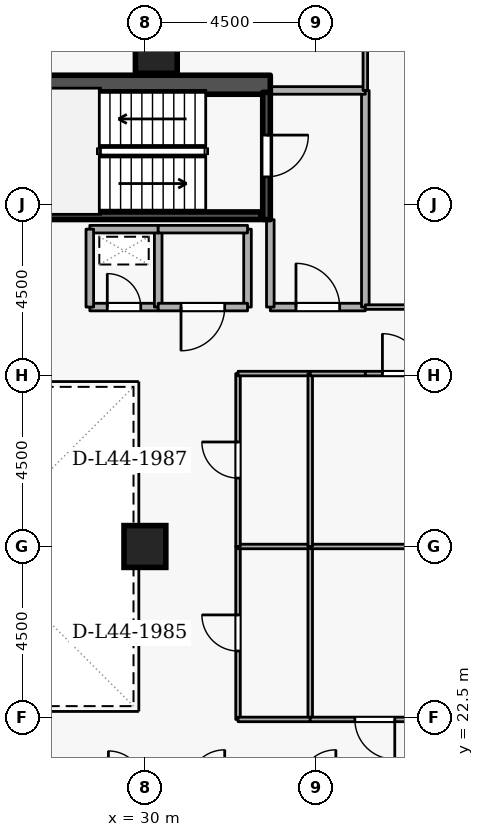
"""IFC4 building model, lengths in metres.
Left out: names, types, materials, properties, quantities, classifications, styles, units other than length and angle.
Written with IfcOpenShell. Run it as: python <this file> out.ifc"""

import sys

from ifc_helpers import new_model, si_unit, direction, frame, frame_2d, origin, origin_2d, place, context, subcontext, project, spatial, rectangle, extrude, element, fill, save


model = new_model("IFC4")
c1 = context("Model", 3, precision=1e-05, world=origin(), true_north=direction((0.0, 1.0)))
c2 = subcontext(c1, "Body", "Model", "MODEL_VIEW")
j1 = project(units=[si_unit("LENGTHUNIT", "METRE"), si_unit("PLANEANGLEUNIT", "RADIAN")], contexts=[c1])
p1 = place(None, origin())
s1 = spatial("IfcSite", under=j1, at=p1, CompositionType="ELEMENT")
p2 = place(p1, origin())
s2 = spatial("IfcBuilding", under=s1, at=p2, CompositionType="ELEMENT")
p3 = place(p2, frame((0.0, 0.0, 167.1)))
s3 = spatial("IfcBuildingStorey", under=s2, at=p3, CompositionType="ELEMENT", Elevation=167.1)
p4 = place(p3, frame((17.7, 39.15, 0.0), z_axis=(0.0, 0.0, 1.0), x_axis=(1.0, 0.0, 0.0)))
e1 = element("IfcWall", 1, at=p4, inside=s3, PredefinedType="SHEAR", context=c2, shape_type="SweptSolid", body=[
    extrude(rectangle(XDim=15.6, YDim=0.5, at=frame_2d((7.8, 0.0))), origin(), (0.0, 0.0, 1.0), 3.6),
])
for number, where, z_axis, x_axis in (
    (2, (30.3, 40.0, 0.0), (0.0, 0.0, 1.0), (1.0, 0.0, 0.0)),
    (3, (30.0, 27.0, 0.0), (0.0, 0.0, 1.0), (1.0, 0.0, 0.0)),
):
    element("IfcColumn", number, at=place(p3, frame(where, z_axis=z_axis, x_axis=x_axis)), inside=s3, PredefinedType="COLUMN", context=c2, shape_type="SweptSolid", body=[
        extrude(rectangle(XDim=1.1, YDim=1.1, at=origin_2d()), origin(), (0.0, 0.0, 1.0), 3.6),
    ])
p5 = place(p3, frame((33.2, 38.95, 0.0), z_axis=(0.0, 0.0, 1.0), x_axis=(0.0, -1.0, 0.0)))
e4 = element("IfcWall", 4, at=p5, inside=s3, PredefinedType="SHEAR", context=c2, shape_type="SweptSolid", body=[
    extrude(rectangle(XDim=3.35, YDim=0.2, at=frame_2d((1.675, 0.0))), origin(), (0.0, 0.0, 1.0), 3.6),
])
p6 = place(p5, frame((1.125, 0.0, 0.0)))
e5 = element("IfcOpeningElement", 5, at=p6, cuts=e4, PredefinedType="OPENING", context=c2, shape_type="SweptSolid", body=[
    extrude(rectangle(XDim=1.1, YDim=2.1, at=frame_2d((0.55, 1.05))), frame((0.0, 0.11, 0.0), z_axis=(0.0, -1.0, 0.0), x_axis=(1.0, 0.0, 0.0)), (0.0, 0.0, 1.0), 0.22),
])
p7 = place(p3, frame((25.95, 35.703, 0.0), z_axis=(0.0, 0.0, 1.0), x_axis=(1.0, 0.0, 0.0)))
e6 = element("IfcWall", 6, at=p7, inside=s3, PredefinedType="SHEAR", context=c2, shape_type="SweptSolid", body=[
    extrude(rectangle(XDim=7.1, YDim=0.2, at=frame_2d((3.55, 0.0))), origin(), (0.0, 0.0, 1.0), 3.6),
])
p8 = place(p3, frame((33.3, 33.3, 0.0), z_axis=(0.0, 0.0, 1.0), x_axis=(1.0, 0.0, 0.0)))
e7 = element("IfcWall", 7, at=p8, inside=s3, PredefinedType="STANDARD", context=c2, shape_type="SweptSolid", body=[
    extrude(rectangle(XDim=2.5, YDim=0.2, at=frame_2d((1.25, 0.0))), origin(), (0.0, 0.0, 1.0), 3.34),
])
p9 = place(p8, frame((0.675, 0.0, 0.0)))
e8 = element("IfcOpeningElement", 8, at=p9, cuts=e7, PredefinedType="OPENING", context=c2, shape_type="SweptSolid", body=[
    extrude(rectangle(XDim=1.15, YDim=2.1, at=frame_2d((0.575, 1.05))), frame((0.0, 0.11, 0.0), z_axis=(0.0, -1.0, 0.0), x_axis=(1.0, 0.0, 0.0)), (0.0, 0.0, 1.0), 0.22),
])
p10 = place(p3, frame((35.8, 33.3, 0.0), z_axis=(0.0, 0.0, 1.0), x_axis=(0.0, 1.0, 0.0)))
e9 = element("IfcWall", 9, at=p10, inside=s3, PredefinedType="STANDARD", context=c2, shape_type="SweptSolid", body=[
    extrude(rectangle(XDim=5.7, YDim=0.2, at=frame_2d((2.85, 0.0))), origin(), (0.0, 0.0, 1.0), 3.34),
])
p11 = place(p3, frame((35.8, 39.0, 0.0), z_axis=(0.0, 0.0, 1.0), x_axis=(-1.0, 0.0, 0.0)))
e10 = element("IfcWall", 10, at=p11, inside=s3, PredefinedType="STANDARD", context=c2, shape_type="SweptSolid", body=[
    extrude(rectangle(XDim=2.5, YDim=0.2, at=frame_2d((1.25, 0.0))), origin(), (0.0, 0.0, 1.0), 3.34),
])
p12 = place(p3, frame((33.3, 35.6, 0.0), z_axis=(0.0, 0.0, 1.0), x_axis=(0.0, -1.0, 0.0)))
e11 = element("IfcWall", 11, at=p12, inside=s3, PredefinedType="STANDARD", context=c2, shape_type="SweptSolid", body=[
    extrude(rectangle(XDim=2.3, YDim=0.2, at=frame_2d((1.15, 0.0))), origin(), (0.0, 0.0, 1.0), 2.545),
])
p13 = place(p3, frame((28.55, 33.3, 0.0), z_axis=(0.0, 0.0, 1.0), x_axis=(1.0, 0.0, 0.0)))
e12 = element("IfcWall", 12, at=p13, inside=s3, PredefinedType="STANDARD", context=c2, shape_type="SweptSolid", body=[
    extrude(rectangle(XDim=1.8, YDim=0.2, at=frame_2d((0.9, 0.0))), origin(), (0.0, 0.0, 1.0), 3.34),
])
p14 = place(p13, frame((0.46, 0.0, 0.0)))
e13 = element("IfcOpeningElement", 13, at=p14, cuts=e12, PredefinedType="OPENING", context=c2, shape_type="SweptSolid", body=[
    extrude(rectangle(XDim=0.88, YDim=2.04, at=frame_2d((0.44, 1.02))), frame((0.0, 0.11, 0.0), z_axis=(0.0, -1.0, 0.0), x_axis=(1.0, 0.0, 0.0)), (0.0, 0.0, 1.0), 0.22),
])
p15 = place(p3, frame((30.35, 33.3, 0.0), z_axis=(0.0, 0.0, 1.0), x_axis=(0.0, 1.0, 0.0)))
e14 = element("IfcWall", 14, at=p15, inside=s3, PredefinedType="STANDARD", context=c2, shape_type="SweptSolid", body=[
    extrude(rectangle(XDim=2.05, YDim=0.2, at=frame_2d((1.025, 0.0))), origin(), (0.0, 0.0, 1.0), 3.34),
])
p16 = place(p3, frame((30.35, 35.35, 0.0), z_axis=(0.0, 0.0, 1.0), x_axis=(-1.0, 0.0, 0.0)))
e15 = element("IfcWall", 15, at=p16, inside=s3, PredefinedType="STANDARD", context=c2, shape_type="SweptSolid", body=[
    extrude(rectangle(XDim=1.8, YDim=0.2, at=frame_2d((0.9, 0.0))), origin(), (0.0, 0.0, 1.0), 3.34),
])
p17 = place(p3, frame((28.55, 35.35, 0.0), z_axis=(0.0, 0.0, 1.0), x_axis=(0.0, -1.0, 0.0)))
e16 = element("IfcWall", 16, at=p17, inside=s3, PredefinedType="STANDARD", context=c2, shape_type="SweptSolid", body=[
    extrude(rectangle(XDim=2.05, YDim=0.2, at=frame_2d((1.025, 0.0))), origin(), (0.0, 0.0, 1.0), 3.34),
])
p18 = place(p3, frame((32.7, 35.35, 0.0), z_axis=(0.0, 0.0, 1.0), x_axis=(0.0, -1.0, 0.0)))
e17 = element("IfcWall", 17, at=p18, inside=s3, PredefinedType="STANDARD", context=c2, shape_type="SweptSolid", body=[
    extrude(rectangle(XDim=2.05, YDim=0.2, at=frame_2d((1.025, 0.0))), origin(), (0.0, 0.0, 1.0), 2.545),
])
p19 = place(p3, frame((32.7, 33.3, 0.0), z_axis=(0.0, 0.0, 1.0), x_axis=(-1.0, 0.0, 0.0)))
e18 = element("IfcWall", 18, at=p19, inside=s3, PredefinedType="STANDARD", context=c2, shape_type="SweptSolid", body=[
    extrude(rectangle(XDim=2.35, YDim=0.2, at=frame_2d((1.175, 0.0))), origin(), (0.0, 0.0, 1.0), 3.34),
])
p20 = place(p19, frame((0.6, 0.0, 0.0)))
e19 = element("IfcOpeningElement", 19, at=p20, cuts=e18, PredefinedType="OPENING", context=c2, shape_type="SweptSolid", body=[
    extrude(rectangle(XDim=1.15, YDim=2.1, at=frame_2d((0.575, 1.05))), frame((0.0, 0.11, 0.0), z_axis=(0.0, -1.0, 0.0), x_axis=(1.0, 0.0, 0.0)), (0.0, 0.0, 1.0), 0.22),
])
p21 = place(p3, frame((30.35, 35.35, 0.0), z_axis=(0.0, 0.0, 1.0), x_axis=(1.0, 0.0, 0.0)))
e20 = element("IfcWall", 20, at=p21, inside=s3, PredefinedType="STANDARD", context=c2, shape_type="SweptSolid", body=[
    extrude(rectangle(XDim=2.35, YDim=0.2, at=frame_2d((1.175, 0.0))), origin(), (0.0, 0.0, 1.0), 3.34),
])
p22 = place(p3, frame((32.45, 22.45, 0.0), z_axis=(0.0, 0.0, 1.0), x_axis=(0.0, 1.0, 0.0)))
e21 = element("IfcWall", 21, at=p22, inside=s3, PredefinedType="PARTITIONING", context=c2, shape_type="SweptSolid", body=[
    extrude(rectangle(XDim=4.55, YDim=0.12, at=frame_2d((2.275, 0.0))), origin(), (0.0, 0.0, 1.0), 3.34),
])
p23 = place(p22, frame((1.8, 0.0, 0.0)))
e22 = element("IfcOpeningElement", 22, at=p23, cuts=e21, PredefinedType="OPENING", context=c2, shape_type="SweptSolid", body=[
    extrude(rectangle(XDim=0.95, YDim=2.1, at=frame_2d((0.475, 1.05))), frame((0.0, 0.07, 0.0), z_axis=(0.0, -1.0, 0.0), x_axis=(1.0, 0.0, 0.0)), (0.0, 0.0, 1.0), 0.14),
])
p24 = place(p3, frame((32.45, 27.0, 0.0), z_axis=(0.0, 0.0, 1.0), x_axis=(1.0, 0.0, 0.0)))
e23 = element("IfcWall", 23, at=p24, inside=s3, PredefinedType="PARTITIONING", context=c2, shape_type="SweptSolid", body=[
    extrude(rectangle(XDim=1.9, YDim=0.12, at=frame_2d((0.95, 0.0))), origin(), (0.0, 0.0, 1.0), 3.34),
])
p25 = place(p3, frame((34.35, 27.0, 0.0), z_axis=(0.0, 0.0, 1.0), x_axis=(0.0, -1.0, 0.0)))
e24 = element("IfcWall", 24, at=p25, inside=s3, PredefinedType="PARTITIONING", context=c2, shape_type="SweptSolid", body=[
    extrude(rectangle(XDim=4.55, YDim=0.12, at=frame_2d((2.275, 0.0))), origin(), (0.0, 0.0, 1.0), 3.34),
])
p26 = place(p3, frame((34.35, 22.45, 0.0), z_axis=(0.0, 0.0, 1.0), x_axis=(-1.0, 0.0, 0.0)))
e25 = element("IfcWall", 25, at=p26, inside=s3, PredefinedType="PARTITIONING", context=c2, shape_type="SweptSolid", body=[
    extrude(rectangle(XDim=1.9, YDim=0.12, at=frame_2d((0.95, 0.0))), origin(), (0.0, 0.0, 1.0), 3.34),
])
p27 = place(p3, frame((37.75, 22.45, 0.0), z_axis=(0.0, 0.0, 1.0), x_axis=(-1.0, 0.0, 0.0)))
e26 = element("IfcWall", 26, at=p27, inside=s3, PredefinedType="PARTITIONING", context=c2, shape_type="SweptSolid", body=[
    extrude(rectangle(XDim=3.4, YDim=0.12, at=frame_2d((1.7, 0.0))), origin(), (0.0, 0.0, 1.0), 3.34),
])
p28 = place(p27, frame((1.175, 0.0, 0.0)))
e27 = element("IfcOpeningElement", 27, at=p28, cuts=e26, PredefinedType="OPENING", context=c2, shape_type="SweptSolid", body=[
    extrude(rectangle(XDim=1.05, YDim=2.1, at=frame_2d((0.525, 1.05))), frame((0.0, 0.07, 0.0), z_axis=(0.0, -1.0, 0.0), x_axis=(1.0, 0.0, 0.0)), (0.0, 0.0, 1.0), 0.14),
])
p29 = place(p3, frame((34.35, 27.0, 0.0), z_axis=(0.0, 0.0, 1.0), x_axis=(1.0, 0.0, 0.0)))
e28 = element("IfcWall", 28, at=p29, inside=s3, PredefinedType="PARTITIONING", context=c2, shape_type="SweptSolid", body=[
    extrude(rectangle(XDim=8.45, YDim=0.12, at=frame_2d((4.225, 0.0))), origin(), (0.0, 0.0, 1.0), 2.882),
])
p30 = place(p3, frame((32.45, 27.0, 0.0), z_axis=(0.0, 0.0, 1.0), x_axis=(0.0, 1.0, 0.0)))
e29 = element("IfcWall", 29, at=p30, inside=s3, PredefinedType="PARTITIONING", context=c2, shape_type="SweptSolid", body=[
    extrude(rectangle(XDim=4.55, YDim=0.12, at=frame_2d((2.275, 0.0))), origin(), (0.0, 0.0, 1.0), 3.34),
])
p31 = place(p30, frame((1.8, 0.0, 0.0)))
e30 = element("IfcOpeningElement", 30, at=p31, cuts=e29, PredefinedType="OPENING", context=c2, shape_type="SweptSolid", body=[
    extrude(rectangle(XDim=0.95, YDim=2.1, at=frame_2d((0.475, 1.05))), frame((0.0, 0.07, 0.0), z_axis=(0.0, -1.0, 0.0), x_axis=(1.0, 0.0, 0.0)), (0.0, 0.0, 1.0), 0.14),
])
p32 = place(p3, frame((32.45, 31.55, 0.0), z_axis=(0.0, 0.0, 1.0), x_axis=(1.0, 0.0, 0.0)))
e31 = element("IfcWall", 31, at=p32, inside=s3, PredefinedType="PARTITIONING", context=c2, shape_type="SweptSolid", body=[
    extrude(rectangle(XDim=1.9, YDim=0.12, at=frame_2d((0.95, 0.0))), origin(), (0.0, 0.0, 1.0), 3.34),
])
p33 = place(p3, frame((34.35, 31.55, 0.0), z_axis=(0.0, 0.0, 1.0), x_axis=(0.0, -1.0, 0.0)))
e32 = element("IfcWall", 32, at=p33, inside=s3, PredefinedType="PARTITIONING", context=c2, shape_type="SweptSolid", body=[
    extrude(rectangle(XDim=4.55, YDim=0.12, at=frame_2d((2.275, 0.0))), origin(), (0.0, 0.0, 1.0), 3.34),
])
p34 = place(p3, frame((34.35, 31.55, 0.0), z_axis=(0.0, 0.0, 1.0), x_axis=(1.0, 0.0, 0.0)))
e33 = element("IfcWall", 33, at=p34, inside=s3, PredefinedType="PARTITIONING", context=c2, shape_type="SweptSolid", body=[
    extrude(rectangle(XDim=1.45, YDim=0.12, at=frame_2d((0.725, 0.0))), origin(), (0.0, 0.0, 1.0), 3.34),
])
p35 = place(p3, frame((35.8, 31.55, 0.0), z_axis=(0.0, 0.0, 1.0), x_axis=(1.0, 0.0, 0.0)))
e34 = element("IfcWall", 34, at=p35, inside=s3, PredefinedType="PARTITIONING", context=c2, shape_type="SweptSolid", body=[
    extrude(rectangle(XDim=1.95, YDim=0.12, at=frame_2d((0.975, 0.0))), origin(), (0.0, 0.0, 1.0), 3.34),
])
p36 = place(p35, frame((0.45, 0.0, 0.0)))
e35 = element("IfcOpeningElement", 35, at=p36, cuts=e34, PredefinedType="OPENING", context=c2, shape_type="SweptSolid", body=[
    extrude(rectangle(XDim=1.05, YDim=2.1, at=frame_2d((0.525, 1.05))), frame((0.0, 0.07, 0.0), z_axis=(0.0, -1.0, 0.0), x_axis=(1.0, 0.0, 0.0)), (0.0, 0.0, 1.0), 0.14),
])
p37 = place(p3, frame((37.75, 33.3, 0.0), z_axis=(0.0, 0.0, 1.0), x_axis=(-1.0, 0.0, 0.0)))
e36 = element("IfcWall", 36, at=p37, inside=s3, PredefinedType="PARTITIONING", context=c2, shape_type="SweptSolid", body=[
    extrude(rectangle(XDim=1.95, YDim=0.12, at=frame_2d((0.975, 0.0))), origin(), (0.0, 0.0, 1.0), 3.34),
])
p38 = place(p3, frame((35.8, 39.0, 0.0), z_axis=(0.0, 0.0, 1.0), x_axis=(0.0, 1.0, 0.0)))
e37 = element("IfcWall", 37, at=p38, inside=s3, PredefinedType="PARTITIONING", context=c2, shape_type="SweptSolid", body=[
    extrude(rectangle(XDim=5.72, YDim=0.12, at=frame_2d((2.86, 0.0))), origin(), (0.0, 0.0, 1.0), 3.34),
])
p39 = place(p6, origin())
e38 = element("IfcDoor", 38, at=p39, inside=s3, OperationType="SINGLE_SWING_LEFT", PredefinedType="DOOR", context=c2, shape_type="SweptSolid", body=[
    extrude(rectangle(XDim=1.1, YDim=2.1, at=frame_2d((0.55, 1.05))), frame((0.0, 0.025, 0.0), z_axis=(0.0, -1.0, 0.0), x_axis=(1.0, 0.0, 0.0)), (0.0, 0.0, 1.0), 0.05),
])
fill(e5, e38)
p40 = place(p9, origin())
e39 = element("IfcDoor", 39, at=p40, inside=s3, OperationType="SINGLE_SWING_LEFT", PredefinedType="DOOR", context=c2, shape_type="SweptSolid", body=[
    extrude(rectangle(XDim=1.15, YDim=2.1, at=frame_2d((0.575, 1.05))), frame((0.0, 0.025, 0.0), z_axis=(0.0, -1.0, 0.0), x_axis=(1.0, 0.0, 0.0)), (0.0, 0.0, 1.0), 0.05),
])
fill(e8, e39)
p41 = place(p14, origin())
e40 = element("IfcDoor", 40, at=p41, inside=s3, OperationType="SINGLE_SWING_LEFT", PredefinedType="DOOR", context=c2, shape_type="SweptSolid", body=[
    extrude(rectangle(XDim=0.88, YDim=2.04, at=frame_2d((0.44, 1.02))), frame((0.0, 0.025, 0.0), z_axis=(0.0, -1.0, 0.0), x_axis=(1.0, 0.0, 0.0)), (0.0, 0.0, 1.0), 0.05),
])
fill(e13, e40)
p42 = place(p20, origin())
e41 = element("IfcDoor", 41, at=p42, inside=s3, OperationType="SINGLE_SWING_RIGHT", PredefinedType="DOOR", context=c2, shape_type="SweptSolid", body=[
    extrude(rectangle(XDim=1.15, YDim=2.1, at=frame_2d((0.575, 1.05))), frame((0.0, 0.025, 0.0), z_axis=(0.0, -1.0, 0.0), x_axis=(1.0, 0.0, 0.0)), (0.0, 0.0, 1.0), 0.05),
])
fill(e19, e41)
p43 = place(p23, origin())
e42 = element("IfcDoor", 42, at=p43, inside=s3, OperationType="SINGLE_SWING_RIGHT", PredefinedType="DOOR", context=c2, shape_type="SweptSolid", body=[
    extrude(rectangle(XDim=0.95, YDim=2.1, at=frame_2d((0.475, 1.05))), frame((0.0, 0.025, 0.0), z_axis=(0.0, -1.0, 0.0), x_axis=(1.0, 0.0, 0.0)), (0.0, 0.0, 1.0), 0.05),
])
fill(e22, e42)
p44 = place(p28, origin())
e43 = element("IfcDoor", 43, at=p44, inside=s3, OperationType="SINGLE_SWING_LEFT", PredefinedType="DOOR", context=c2, shape_type="SweptSolid", body=[
    extrude(rectangle(XDim=1.05, YDim=2.1, at=frame_2d((0.525, 1.05))), frame((0.0, 0.025, 0.0), z_axis=(0.0, -1.0, 0.0), x_axis=(1.0, 0.0, 0.0)), (0.0, 0.0, 1.0), 0.05),
])
fill(e27, e43)
p45 = place(p31, origin())
e44 = element("IfcDoor", 44, at=p45, inside=s3, OperationType="SINGLE_SWING_RIGHT", PredefinedType="DOOR", context=c2, shape_type="SweptSolid", body=[
    extrude(rectangle(XDim=0.95, YDim=2.1, at=frame_2d((0.475, 1.05))), frame((0.0, 0.025, 0.0), z_axis=(0.0, -1.0, 0.0), x_axis=(1.0, 0.0, 0.0)), (0.0, 0.0, 1.0), 0.05),
])
fill(e30, e44)
p46 = place(p36, origin())
e45 = element("IfcDoor", 45, at=p46, inside=s3, OperationType="SINGLE_SWING_LEFT", PredefinedType="DOOR", context=c2, shape_type="SweptSolid", body=[
    extrude(rectangle(XDim=1.05, YDim=2.1, at=frame_2d((0.525, 1.05))), frame((0.0, 0.025, 0.0), z_axis=(0.0, -1.0, 0.0), x_axis=(1.0, 0.0, 0.0)), (0.0, 0.0, 1.0), 0.05),
])
fill(e35, e45)
save(model, sys.argv[1])
